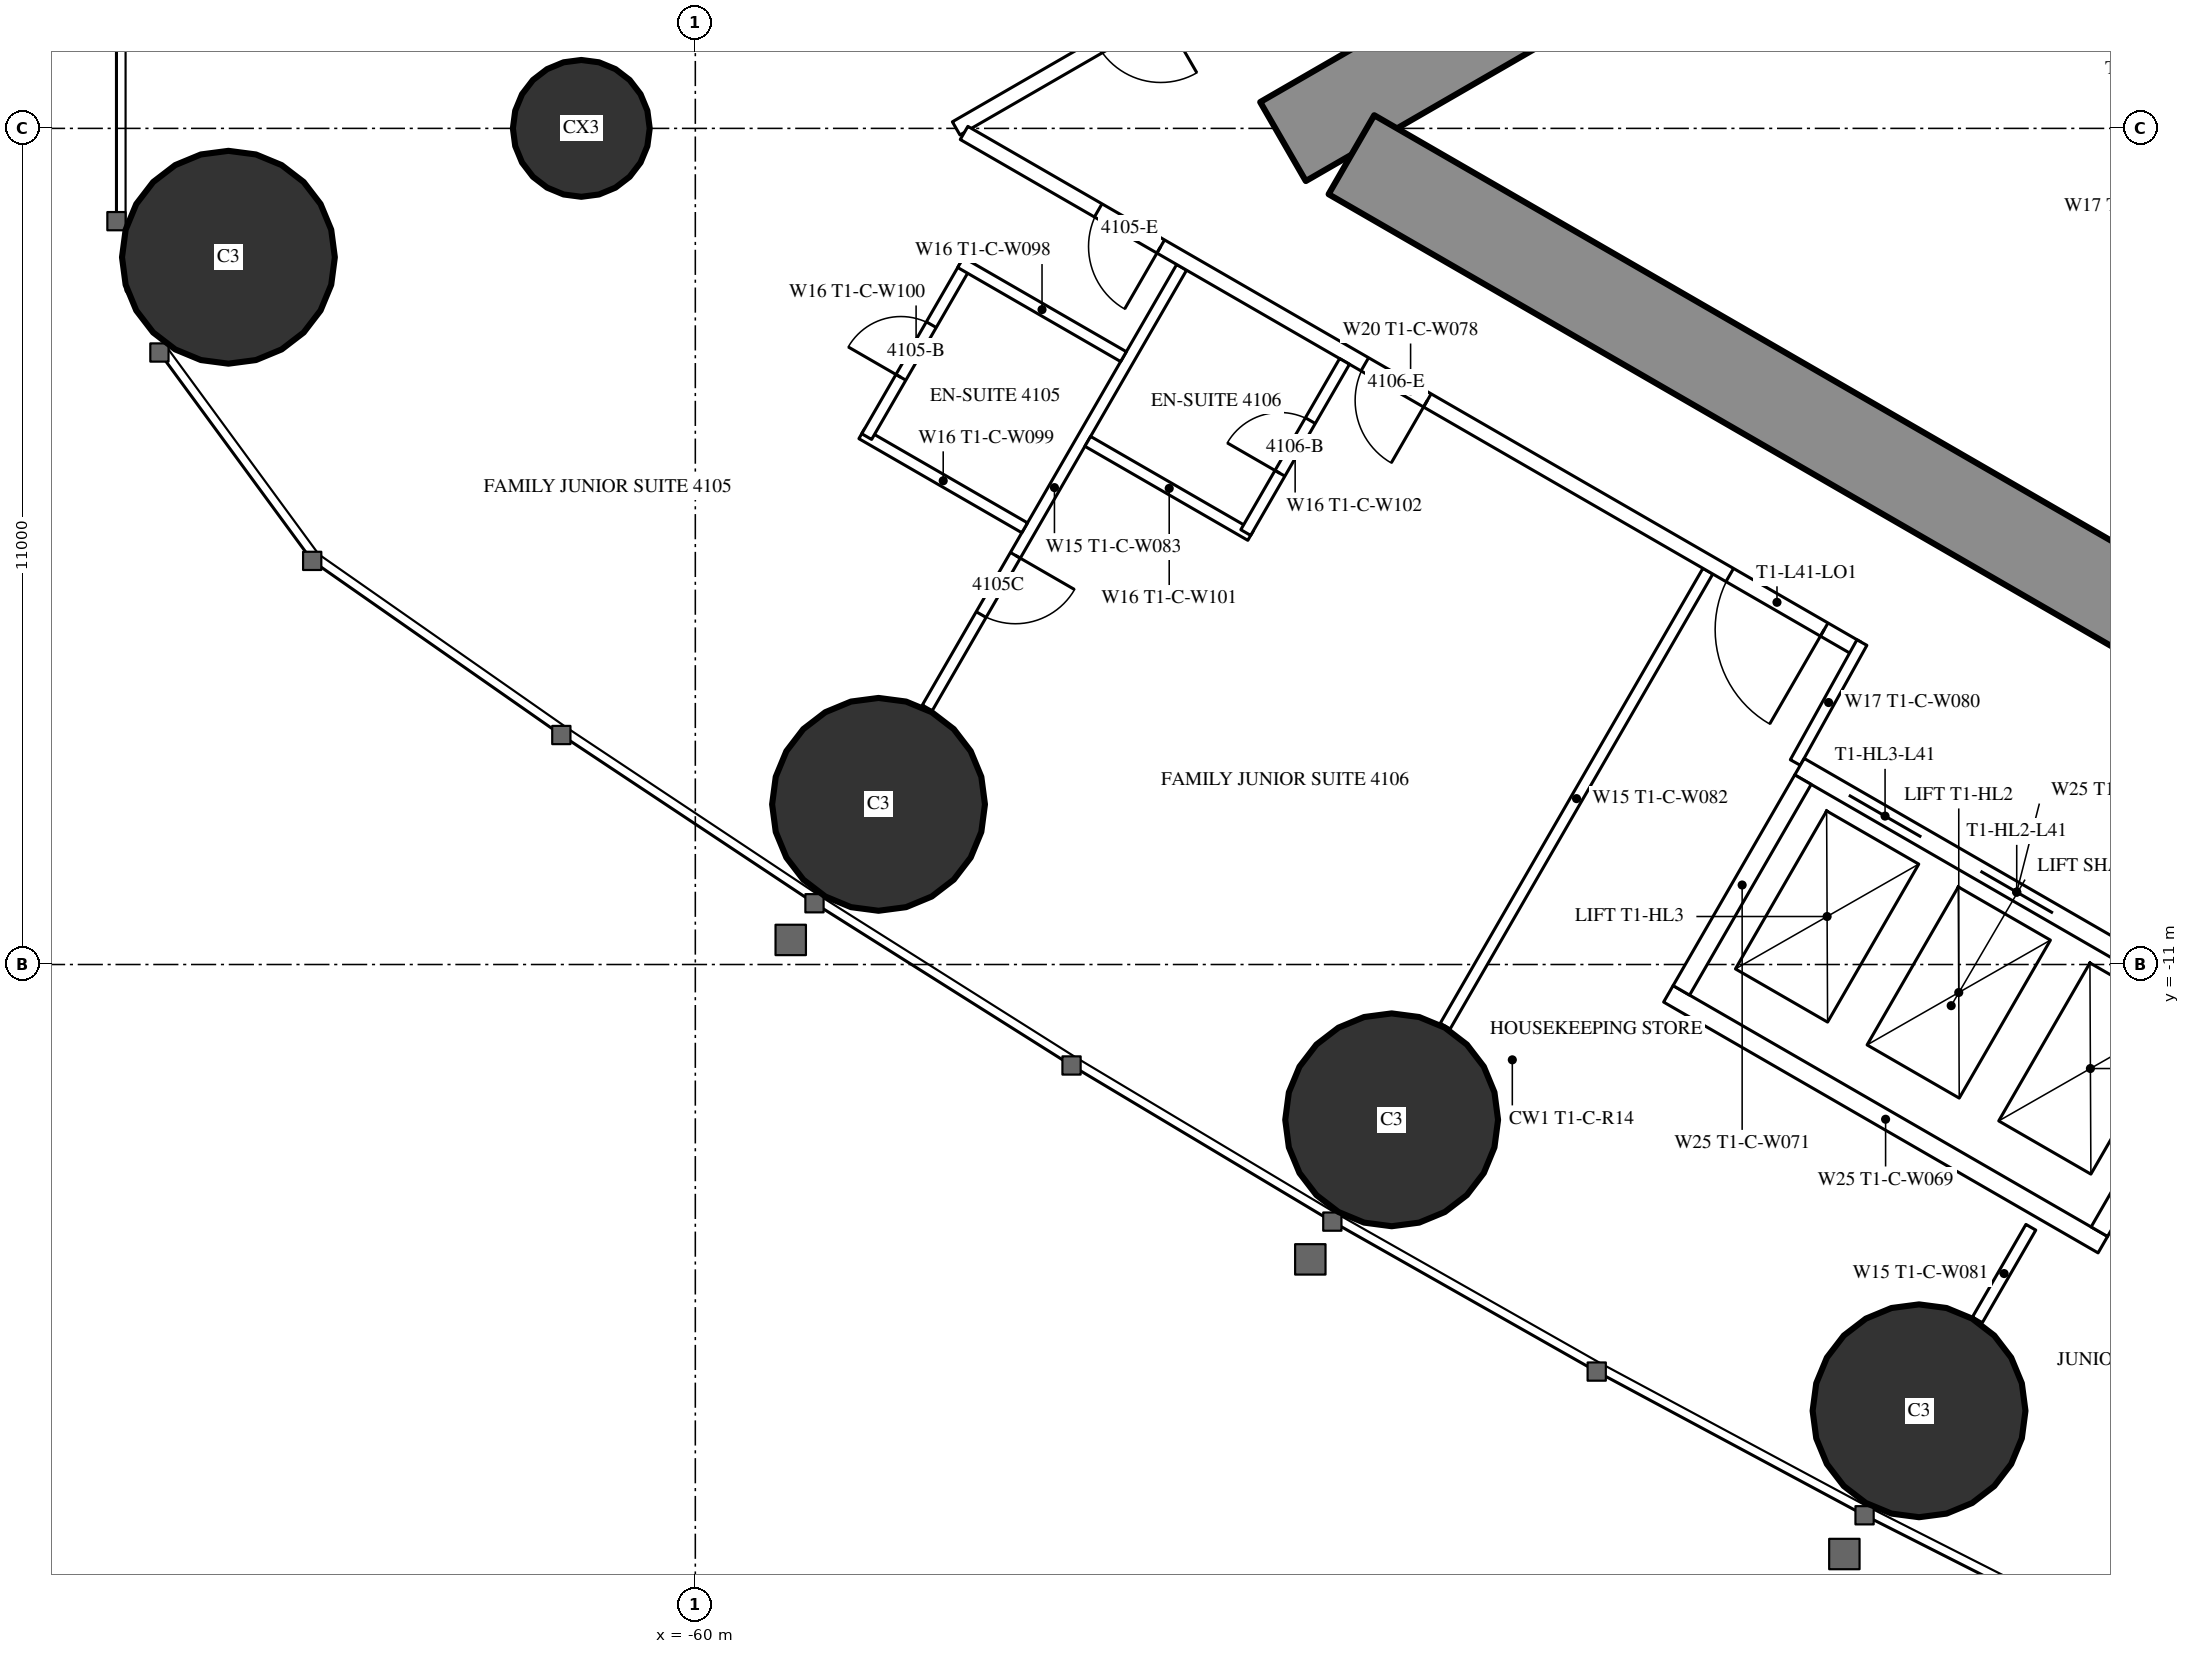
"""IFC4 building model, lengths in metres.
Left out: names, types, materials, properties, quantities, classifications, styles, units other than length and angle.
Written with IfcOpenShell. Run it as: python <this file> out.ifc"""

import sys

from ifc_helpers import new_model, si_unit, direction, frame, frame_2d, origin, origin_2d, place, context, subcontext, project, spatial, rectangle, circle, extrude, element, fill, save


model = new_model("IFC4")
c1 = context("Model", 3, precision=1e-05, world=origin(), true_north=direction((0.0, 1.0)))
c2 = subcontext(c1, "Body", "Model", "MODEL_VIEW")
j1 = project(units=[si_unit("LENGTHUNIT", "METRE"), si_unit("PLANEANGLEUNIT", "RADIAN")], contexts=[c1])
p1 = place(None, origin())
s1 = spatial("IfcSite", under=j1, at=p1, CompositionType="ELEMENT")
p2 = place(p1, origin())
s2 = spatial("IfcBuilding", under=s1, at=p2, CompositionType="ELEMENT")
p3 = place(p2, frame((0.0, 0.0, 156.3)))
s3 = spatial("IfcBuildingStorey", under=s2, at=p3, CompositionType="ELEMENT", Elevation=156.3)
for number, where, z_axis, x_axis in (
    (1, (-66.143, -1.695, 0.0), (0.0, 0.0, 1.0), (1.0, 0.0, 0.0)),
    (2, (-57.59, -8.893, 0.0), (0.0, 0.0, 1.0), (1.0, 0.0, 0.0)),
    (3, (-50.839, -13.043, 0.0), (0.0, 0.0, 1.0), (1.0, 0.0, 0.0)),
    (4, (-43.9, -16.871, 0.0), (0.0, 0.0, 1.0), (1.0, 0.0, 0.0)),
):
    element("IfcColumn", number, at=place(p3, frame(where, z_axis=z_axis, x_axis=x_axis)), inside=s3, PredefinedType="COLUMN", context=c2, shape_type="SweptSolid", body=[
        extrude(circle(Radius=1.4, at=origin_2d()), origin(), (0.0, 0.0, 1.0), 3.5),
    ])
p4 = place(p3, frame((-61.5, 0.0, 0.0), z_axis=(0.0, 0.0, 1.0), x_axis=(1.0, 0.0, 0.0)))
e5 = element("IfcColumn", 5, at=p4, inside=s3, PredefinedType="COLUMN", context=c2, shape_type="SweptSolid", body=[
    extrude(circle(Radius=0.9, at=origin_2d()), origin(), (0.0, 0.0, 1.0), 3.5),
])
p5 = place(p3, frame((-27.2, 14.3, 0.0), z_axis=(0.0, 0.0, 1.0), x_axis=(-0.866026593062, -0.499997940104, 0.0)))
e6 = element("IfcWall", 6, at=p5, inside=s3, PredefinedType="SHEAR", context=c2, shape_type="SweptSolid", body=[
    extrude(rectangle(XDim=28.946, YDim=1.2, at=frame_2d((14.473, 0.0))), origin(), (0.0, 0.0, 1.0), 3.5),
])
p6 = place(p5, frame((4.6, 0.0, 0.0)))
e7 = element("IfcOpeningElement", 7, at=p6, cuts=e6, PredefinedType="OPENING", context=c2, shape_type="SweptSolid", body=[
    extrude(rectangle(XDim=1.0, YDim=2.2, at=frame_2d((0.5, 1.1))), frame((0.0, 0.61, 0.0), z_axis=(0.0, -1.0, 0.0), x_axis=(1.0, 0.0, 0.0)), (0.0, 0.0, 1.0), 1.22),
])
p7 = place(p5, frame((13.395, 0.0, 0.0)))
e8 = element("IfcOpeningElement", 8, at=p7, cuts=e6, PredefinedType="OPENING", context=c2, shape_type="SweptSolid", body=[
    extrude(rectangle(XDim=1.8, YDim=2.2, at=frame_2d((0.9, 1.1))), frame((0.0, 0.61, 0.0), z_axis=(0.0, -1.0, 0.0), x_axis=(1.0, 0.0, 0.0)), (0.0, 0.0, 1.0), 1.22),
])
p8 = place(p3, frame((-27.2, -14.3, 0.0), z_axis=(0.0, 0.0, 1.0), x_axis=(-0.866024021859, 0.500002393557, 0.0)))
e9 = element("IfcWall", 9, at=p8, inside=s3, PredefinedType="SHEAR", context=c2, shape_type="SweptSolid", body=[
    extrude(rectangle(XDim=27.907, YDim=1.2, at=frame_2d((13.954, 0.0))), origin(), (0.0, 0.0, 1.0), 3.5),
])
p9 = place(p8, frame((4.6, 0.0, 0.0)))
e10 = element("IfcOpeningElement", 10, at=p9, cuts=e9, PredefinedType="OPENING", context=c2, shape_type="SweptSolid", body=[
    extrude(rectangle(XDim=1.0, YDim=2.2, at=frame_2d((0.5, 1.1))), frame((0.0, 0.61, 0.0), z_axis=(0.0, -1.0, 0.0), x_axis=(1.0, 0.0, 0.0)), (0.0, 0.0, 1.0), 1.22),
])
p10 = place(p8, frame((13.395, 0.0, 0.0)))
e11 = element("IfcOpeningElement", 11, at=p10, cuts=e9, PredefinedType="OPENING", context=c2, shape_type="SweptSolid", body=[
    extrude(rectangle(XDim=1.8, YDim=2.2, at=frame_2d((0.9, 1.1))), frame((0.0, 0.61, 0.0), z_axis=(0.0, -1.0, 0.0), x_axis=(1.0, 0.0, 0.0)), (0.0, 0.0, 1.0), 1.22),
])
p11 = place(p3, frame((-27.86, 16.575, 0.0), z_axis=(0.0, 0.0, 1.0), x_axis=(-0.866025533911, -0.499999774615, 0.0)))
e12 = element("IfcWall", 12, at=p11, inside=s3, PredefinedType="PARTITIONING", context=c2, shape_type="SweptSolid", body=[
    extrude(rectangle(XDim=33.149, YDim=0.2, at=frame_2d((16.575, 0.0))), origin(), (0.0, 0.0, 1.0), 3.25),
])
p12 = place(p11, frame((3.75, 0.0, 0.0)))
e13 = element("IfcOpeningElement", 13, at=p12, cuts=e12, PredefinedType="OPENING", context=c2, shape_type="SweptSolid", body=[
    extrude(rectangle(XDim=1.0, YDim=2.2, at=frame_2d((0.5, 1.1))), frame((0.0, 0.11, 0.0), z_axis=(0.0, -1.0, 0.0), x_axis=(1.0, 0.0, 0.0)), (0.0, 0.0, 1.0), 0.22),
])
p13 = place(p11, frame((17.997, 0.0, 0.0)))
e14 = element("IfcOpeningElement", 14, at=p13, cuts=e12, PredefinedType="OPENING", context=c2, shape_type="SweptSolid", body=[
    extrude(rectangle(XDim=0.95, YDim=2.2, at=frame_2d((0.475, 1.1))), frame((0.0, 0.11, 0.0), z_axis=(0.0, -1.0, 0.0), x_axis=(1.0, 0.0, 0.0)), (0.0, 0.0, 1.0), 0.22),
])
p14 = place(p11, frame((22.047, 0.0, 0.0)))
e15 = element("IfcOpeningElement", 15, at=p14, cuts=e12, PredefinedType="OPENING", context=c2, shape_type="SweptSolid", body=[
    extrude(rectangle(XDim=0.95, YDim=2.2, at=frame_2d((0.475, 1.1))), frame((0.0, 0.11, 0.0), z_axis=(0.0, -1.0, 0.0), x_axis=(1.0, 0.0, 0.0)), (0.0, 0.0, 1.0), 0.22),
])
p15 = place(p11, frame((30.042, 0.0, 0.0)))
e16 = element("IfcOpeningElement", 16, at=p15, cuts=e12, PredefinedType="OPENING", context=c2, shape_type="SweptSolid", body=[
    extrude(rectangle(XDim=0.95, YDim=2.2, at=frame_2d((0.475, 1.1))), frame((0.0, 0.11, 0.0), z_axis=(0.0, -1.0, 0.0), x_axis=(1.0, 0.0, 0.0)), (0.0, 0.0, 1.0), 0.22),
])
p16 = place(p3, frame((-46.679, -5.825, 0.0), z_axis=(0.0, 0.0, 1.0), x_axis=(-0.500006839597, -0.866021454905, 0.0)))
e17 = element("IfcWall", 17, at=p16, inside=s3, PredefinedType="PARTITIONING", context=c2, shape_type="SweptSolid", body=[
    extrude(rectangle(XDim=6.911, YDim=0.15, at=frame_2d((3.456, 0.0))), origin(), (0.0, 0.0, 1.0), 2.3),
])
p17 = place(p3, frame((-53.602, -1.828, 0.0), z_axis=(0.0, 0.0, 1.0), x_axis=(-0.49999191814, -0.866030069798, 0.0)))
e18 = element("IfcWall", 18, at=p17, inside=s3, PredefinedType="PARTITIONING", context=c2, shape_type="SweptSolid", body=[
    extrude(rectangle(XDim=6.692, YDim=0.15, at=frame_2d((3.346, 0.0))), origin(), (0.0, 0.0, 1.0), 2.3),
])
p18 = place(p17, frame((4.375, 0.0, 0.0)))
e19 = element("IfcOpeningElement", 19, at=p18, cuts=e18, PredefinedType="OPENING", context=c2, shape_type="SweptSolid", body=[
    extrude(rectangle(XDim=0.9, YDim=2.2, at=frame_2d((0.45, 1.1))), frame((0.0, 0.085, 0.0), z_axis=(0.0, -1.0, 0.0), x_axis=(1.0, 0.0, 0.0)), (0.0, 0.0, 1.0), 0.17),
])
p19 = place(p3, frame((-42.429, -14.457, 0.0), z_axis=(0.0, 0.0, 1.0), x_axis=(-0.5000578829, -0.865991982497, 0.0)))
e20 = element("IfcWall", 20, at=p19, inside=s3, PredefinedType="PARTITIONING", context=c2, shape_type="SweptSolid", body=[
    extrude(rectangle(XDim=1.407, YDim=0.15, at=frame_2d((0.704, 0.0))), origin(), (0.0, 0.0, 1.0), 3.25),
])
p20 = place(p3, frame((-44.715, -6.844, 0.0), z_axis=(0.0, 0.0, 1.0), x_axis=(-0.866025261224, 0.500000246922, 0.0)))
e21 = element("IfcWall", 21, at=p20, inside=s3, PredefinedType="PARTITIONING", context=c2, shape_type="SweptSolid", body=[
    extrude(rectangle(XDim=13.567, YDim=0.2, at=frame_2d((6.783, 0.0))), origin(), (0.0, 0.0, 1.0), 3.25),
])
p21 = place(p20, frame((10.579, 0.0, 0.0)))
e22 = element("IfcOpeningElement", 22, at=p21, cuts=e21, PredefinedType="OPENING", context=c2, shape_type="SweptSolid", body=[
    extrude(rectangle(XDim=0.95, YDim=2.2, at=frame_2d((0.475, 1.1))), frame((0.0, 0.11, 0.0), z_axis=(0.0, -1.0, 0.0), x_axis=(1.0, 0.0, 0.0)), (0.0, 0.0, 1.0), 0.22),
])
p22 = place(p20, frame((6.529, 0.0, 0.0)))
e23 = element("IfcOpeningElement", 23, at=p22, cuts=e21, PredefinedType="OPENING", context=c2, shape_type="SweptSolid", body=[
    extrude(rectangle(XDim=0.95, YDim=2.2, at=frame_2d((0.475, 1.1))), frame((0.0, 0.11, 0.0), z_axis=(0.0, -1.0, 0.0), x_axis=(1.0, 0.0, 0.0)), (0.0, 0.0, 1.0), 0.22),
])
p23 = place(p20, frame((0.5, 0.0, 0.0)))
e24 = element("IfcOpeningElement", 24, at=p23, cuts=e21, PredefinedType="OPENING", context=c2, shape_type="SweptSolid", body=[
    extrude(rectangle(XDim=1.435, YDim=2.2, at=frame_2d((0.718, 1.1))), frame((0.0, 0.11, 0.0), z_axis=(0.0, -1.0, 0.0), x_axis=(1.0, 0.0, 0.0)), (0.0, 0.0, 1.0), 0.22),
])
p24 = place(p3, frame((-44.652, -6.764, 0.0), z_axis=(0.0, 0.0, 1.0), x_axis=(-0.485424724123, -0.874278466629, 0.0)))
e25 = element("IfcWall", 25, at=p24, inside=s3, PredefinedType="PARTITIONING", context=c2, shape_type="SweptSolid", body=[
    extrude(rectangle(XDim=1.805, YDim=0.15, at=frame_2d((0.903, 0.0))), origin(), (0.0, 0.0, 1.0), 3.25),
])
p25 = place(p3, frame((-55.667, -5.255, 0.0), z_axis=(0.0, 0.0, 1.0), x_axis=(-0.866006523861, 0.500032699561, 0.0)))
e26 = element("IfcWall", 26, at=p25, inside=s3, PredefinedType="PARTITIONING", context=c2, shape_type="SweptSolid", body=[
    extrude(rectangle(XDim=2.475, YDim=0.15, at=frame_2d((1.237, 0.0))), origin(), (0.0, 0.0, 1.0), 3.25),
])
p26 = place(p3, frame((-56.446, -1.803, 0.0), z_axis=(0.0, 0.0, 1.0), x_axis=(-0.499936506574, -0.866062058628, 0.0)))
e27 = element("IfcWall", 27, at=p26, inside=s3, PredefinedType="PARTITIONING", context=c2, shape_type="SweptSolid", body=[
    extrude(rectangle(XDim=2.6, YDim=0.15, at=frame_2d((1.3, 0.0))), origin(), (0.0, 0.0, 1.0), 3.25),
])
p27 = place(p26, frame((0.9, 0.0, 0.0)))
e28 = element("IfcOpeningElement", 28, at=p27, cuts=e27, PredefinedType="OPENING", context=c2, shape_type="SweptSolid", body=[
    extrude(rectangle(XDim=0.8, YDim=2.2, at=frame_2d((0.4, 1.1))), frame((0.0, 0.085, 0.0), z_axis=(0.0, -1.0, 0.0), x_axis=(1.0, 0.0, 0.0)), (0.0, 0.0, 1.0), 0.17),
])
for number, where, z_axis, x_axis in (
    (29, (-54.367, -3.003, 0.0), (0.0, 0.0, 1.0), (-0.866, 0.5, 0.0)),
    (30, (-52.694, -5.355, 0.0), (0.0, 0.0, 1.0), (-0.866, 0.5, 0.0)),
):
    element("IfcWall", number, at=place(p3, frame(where, z_axis=z_axis, x_axis=x_axis)), inside=s3, PredefinedType="PARTITIONING", context=c2, shape_type="SweptSolid", body=[
        extrude(rectangle(XDim=2.475, YDim=0.15, at=frame_2d((1.238, 0.0))), origin(), (0.0, 0.0, 1.0), 3.25),
    ])
p28 = place(p3, frame((-51.459, -3.065, 0.0), z_axis=(0.0, 0.0, 1.0), x_axis=(-0.499936506574, -0.866062058628, 0.0)))
e31 = element("IfcWall", 31, at=p28, inside=s3, PredefinedType="PARTITIONING", context=c2, shape_type="SweptSolid", body=[
    extrude(rectangle(XDim=2.6, YDim=0.15, at=frame_2d((1.3, 0.0))), origin(), (0.0, 0.0, 1.0), 3.25),
])
p29 = place(p28, frame((0.9, 0.0, 0.0)))
e32 = element("IfcOpeningElement", 32, at=p29, cuts=e31, PredefinedType="OPENING", context=c2, shape_type="SweptSolid", body=[
    extrude(rectangle(XDim=0.8, YDim=2.2, at=frame_2d((0.4, 1.1))), frame((0.0, 0.085, 0.0), z_axis=(0.0, -1.0, 0.0), x_axis=(1.0, 0.0, 0.0)), (0.0, 0.0, 1.0), 0.17),
])
p30 = place(p3, frame((-39.758, -11.697, 0.0), z_axis=(0.0, 0.0, 1.0), x_axis=(-0.866024194504, 0.500002094529, 0.0)))
e33 = element("IfcWall", 33, at=p30, inside=s3, PredefinedType="PARTITIONING", context=c2, shape_type="SweptSolid", body=[
    extrude(rectangle(XDim=6.6, YDim=0.25, at=frame_2d((3.3, 0.0))), origin(), (0.0, 0.0, 1.0), 3.25),
])
p31 = place(p30, frame((0.75, 0.0, 0.0)))
e34 = element("IfcOpeningElement", 34, at=p31, cuts=e33, PredefinedType="OPENING", context=c2, shape_type="SweptSolid", body=[
    extrude(rectangle(XDim=1.1, YDim=2.2, at=frame_2d((0.55, 1.1))), frame((0.0, 0.135, 0.0), z_axis=(0.0, -1.0, 0.0), x_axis=(1.0, 0.0, 0.0)), (0.0, 0.0, 1.0), 0.27),
])
p32 = place(p30, frame((2.75, 0.0, 0.0)))
e35 = element("IfcOpeningElement", 35, at=p32, cuts=e33, PredefinedType="OPENING", context=c2, shape_type="SweptSolid", body=[
    extrude(rectangle(XDim=1.1, YDim=2.2, at=frame_2d((0.55, 1.1))), frame((0.0, 0.135, 0.0), z_axis=(0.0, -1.0, 0.0), x_axis=(1.0, 0.0, 0.0)), (0.0, 0.0, 1.0), 0.27),
])
p33 = place(p30, frame((4.75, 0.0, 0.0)))
e36 = element("IfcOpeningElement", 36, at=p33, cuts=e33, PredefinedType="OPENING", context=c2, shape_type="SweptSolid", body=[
    extrude(rectangle(XDim=1.1, YDim=2.2, at=frame_2d((0.55, 1.1))), frame((0.0, 0.135, 0.0), z_axis=(0.0, -1.0, 0.0), x_axis=(1.0, 0.0, 0.0)), (0.0, 0.0, 1.0), 0.27),
])
p34 = place(p3, frame((-41.482, -14.686, 0.0), z_axis=(0.0, 0.0, 1.0), x_axis=(-0.86603344179, 0.499986077507, 0.0)))
e37 = element("IfcWall", 37, at=p34, inside=s3, PredefinedType="PARTITIONING", context=c2, shape_type="SweptSolid", body=[
    extrude(rectangle(XDim=6.6, YDim=0.25, at=frame_2d((3.3, 0.0))), origin(), (0.0, 0.0, 1.0), 3.25),
])
for number, where, z_axis, x_axis in (
    (38, (-39.928, -11.743, 0.0), (0.0, 0.0, 1.0), (-0.5, -0.866, 0.0)),
    (39, (-45.428, -8.568, 0.0), (0.0, 0.0, 1.0), (-0.5, -0.866, 0.0)),
):
    element("IfcWall", number, at=place(p3, frame(where, z_axis=z_axis, x_axis=x_axis)), inside=s3, PredefinedType="PARTITIONING", context=c2, shape_type="SweptSolid", body=[
        extrude(rectangle(XDim=3.201, YDim=0.25, at=frame_2d((1.6, 0.0))), origin(), (0.0, 0.0, 1.0), 3.25),
    ])
p35 = place(p27, origin())
e40 = element("IfcDoor", 40, at=p35, inside=s3, OperationType="SINGLE_SWING_RIGHT", PredefinedType="DOOR", context=c2, shape_type="SweptSolid", body=[
    extrude(rectangle(XDim=0.8, YDim=2.2, at=frame_2d((0.4, 1.1))), frame((0.0, 0.025, 0.0), z_axis=(0.0, -1.0, 0.0), x_axis=(1.0, 0.0, 0.0)), (0.0, 0.0, 1.0), 0.05),
])
fill(e28, e40)
p36 = place(p21, origin())
e41 = element("IfcDoor", 41, at=p36, inside=s3, OperationType="SINGLE_SWING_LEFT", PredefinedType="DOOR", context=c2, shape_type="SweptSolid", body=[
    extrude(rectangle(XDim=0.95, YDim=2.2, at=frame_2d((0.475, 1.1))), frame((0.0, 0.025, 0.0), z_axis=(0.0, -1.0, 0.0), x_axis=(1.0, 0.0, 0.0)), (0.0, 0.0, 1.0), 0.05),
])
fill(e22, e41)
p37 = place(p29, origin())
e42 = element("IfcDoor", 42, at=p37, inside=s3, OperationType="SINGLE_SWING_RIGHT", PredefinedType="DOOR", context=c2, shape_type="SweptSolid", body=[
    extrude(rectangle(XDim=0.8, YDim=2.2, at=frame_2d((0.4, 1.1))), frame((0.0, 0.025, 0.0), z_axis=(0.0, -1.0, 0.0), x_axis=(1.0, 0.0, 0.0)), (0.0, 0.0, 1.0), 0.05),
])
fill(e32, e42)
p38 = place(p22, origin())
e43 = element("IfcDoor", 43, at=p38, inside=s3, OperationType="SINGLE_SWING_LEFT", PredefinedType="DOOR", context=c2, shape_type="SweptSolid", body=[
    extrude(rectangle(XDim=0.95, YDim=2.2, at=frame_2d((0.475, 1.1))), frame((0.0, 0.025, 0.0), z_axis=(0.0, -1.0, 0.0), x_axis=(1.0, 0.0, 0.0)), (0.0, 0.0, 1.0), 0.05),
])
fill(e23, e43)
p39 = place(p23, origin())
e44 = element("IfcDoor", 44, at=p39, inside=s3, OperationType="SINGLE_SWING_LEFT", PredefinedType="DOOR", context=c2, shape_type="SweptSolid", body=[
    extrude(rectangle(XDim=1.435, YDim=2.2, at=frame_2d((0.718, 1.1))), frame((0.0, 0.025, 0.0), z_axis=(0.0, -1.0, 0.0), x_axis=(1.0, 0.0, 0.0)), (0.0, 0.0, 1.0), 0.05),
])
fill(e24, e44)
p40 = place(p18, origin())
e45 = element("IfcDoor", 45, at=p40, inside=s3, OperationType="SINGLE_SWING_LEFT", PredefinedType="DOOR", context=c2, shape_type="SweptSolid", body=[
    extrude(rectangle(XDim=0.9, YDim=2.2, at=frame_2d((0.45, 1.1))), frame((0.0, 0.025, 0.0), z_axis=(0.0, -1.0, 0.0), x_axis=(1.0, 0.0, 0.0)), (0.0, 0.0, 1.0), 0.05),
])
fill(e19, e45)
p41 = place(p32, origin())
e46 = element("IfcDoor", 46, at=p41, inside=s3, OperationType="DOUBLE_DOOR_SLIDING", PredefinedType="USERDEFINED", context=c2, shape_type="SweptSolid", body=[
    extrude(rectangle(XDim=1.1, YDim=2.2, at=frame_2d((0.55, 1.1))), frame((0.0, 0.025, 0.0), z_axis=(0.0, -1.0, 0.0), x_axis=(1.0, 0.0, 0.0)), (0.0, 0.0, 1.0), 0.05),
])
fill(e35, e46)
p42 = place(p33, origin())
e47 = element("IfcDoor", 47, at=p42, inside=s3, OperationType="DOUBLE_DOOR_SLIDING", PredefinedType="USERDEFINED", context=c2, shape_type="SweptSolid", body=[
    extrude(rectangle(XDim=1.1, YDim=2.2, at=frame_2d((0.55, 1.1))), frame((0.0, 0.025, 0.0), z_axis=(0.0, -1.0, 0.0), x_axis=(1.0, 0.0, 0.0)), (0.0, 0.0, 1.0), 0.05),
])
fill(e36, e47)
save(model, sys.argv[1])
